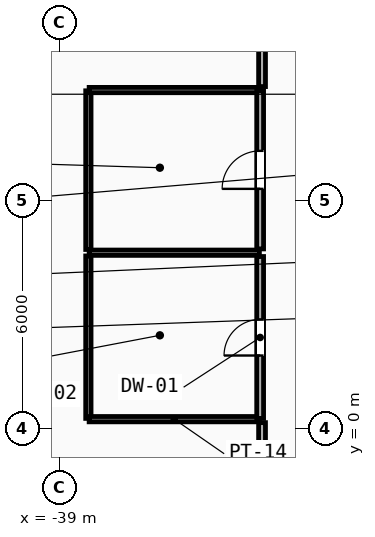
"""IFC4 building model, lengths in metres.
Left out: names, types, materials, properties, quantities, classifications, styles, units other than length and angle.
Written with IfcOpenShell. Run it as: python <this file> out.ifc"""

import sys

from ifc_helpers import new_model, si_unit, direction, frame, frame_2d, origin, place, context, subcontext, project, spatial, rectangle, extrude, element, fill, save


model = new_model("IFC4")
c1 = context("Model", 3, precision=1e-05, world=origin(), true_north=direction((0.0, 1.0)))
c2 = subcontext(c1, "Body", "Model", "MODEL_VIEW")
j1 = project(units=[si_unit("LENGTHUNIT", "METRE"), si_unit("PLANEANGLEUNIT", "RADIAN")], contexts=[c1])
p1 = place(None, origin())
s1 = spatial("IfcSite", under=j1, at=p1, CompositionType="ELEMENT")
p2 = place(p1, origin())
s2 = spatial("IfcBuilding", under=s1, at=p2, CompositionType="ELEMENT")
p3 = place(p2, frame((0.0, 0.0, 73.4)))
s3 = spatial("IfcBuildingStorey", under=s2, at=p3, CompositionType="ELEMENT", Elevation=73.4)
p4 = place(p3, frame((-38.24, 0.27, 0.0), z_axis=(0.0, 0.0, 1.0), x_axis=(0.0, 1.0, 0.0)))
e1 = element("IfcWall", 1, at=p4, inside=s3, PredefinedType="PARTITIONING", context=c2, shape_type="SweptSolid", body=[
    extrude(rectangle(XDim=4.275, YDim=0.14, at=frame_2d((2.137, 0.0))), origin(), (0.0, 0.0, 1.0), 3.52),
])
p5 = place(p3, frame((-38.24, 4.715, 0.0), z_axis=(0.0, 0.0, 1.0), x_axis=(0.0, 1.0, 0.0)))
e2 = element("IfcWall", 2, at=p5, inside=s3, PredefinedType="PARTITIONING", context=c2, shape_type="SweptSolid", body=[
    extrude(rectangle(XDim=4.175, YDim=0.14, at=frame_2d((2.087, 0.0))), origin(), (0.0, 0.0, 1.0), 3.52),
])
for number, where, z_axis, x_axis in (
    (3, (-38.22, 0.25, 0.0), (0.0, 0.0, 1.0), (1.0, 0.0, 0.0)),
    (4, (-38.22, 4.63, 0.0), (0.0, 0.0, 1.0), (1.0, 0.0, 0.0)),
    (5, (-38.22, 8.91, 0.0), (0.0, 0.0, 1.0), (1.0, 0.0, 0.0)),
):
    element("IfcWall", number, at=place(p3, frame(where, z_axis=z_axis, x_axis=x_axis)), inside=s3, PredefinedType="PARTITIONING", context=c2, shape_type="SweptSolid", body=[
        extrude(rectangle(XDim=4.48, YDim=0.14, at=frame_2d((2.24, 0.0))), origin(), (0.0, 0.0, 1.0), 3.52),
    ])
p6 = place(p3, frame((-33.72, 0.27, 0.0), z_axis=(0.0, 0.0, 1.0), x_axis=(0.0, 1.0, 0.0)))
e6 = element("IfcWall", 6, at=p6, inside=s3, PredefinedType="PARTITIONING", context=c2, shape_type="SweptSolid", body=[
    extrude(rectangle(XDim=4.26, YDim=0.18, at=frame_2d((2.13, 0.0))), origin(), (0.0, 0.0, 1.0), 3.52),
])
p7 = place(p6, frame((1.655, 0.0, 0.0)))
e7 = element("IfcOpeningElement", 7, at=p7, cuts=e6, PredefinedType="OPENING", context=c2, shape_type="SweptSolid", body=[
    extrude(rectangle(XDim=0.95, YDim=2.1, at=frame_2d((0.475, 1.05))), frame((0.0, 0.1, 0.0), z_axis=(0.0, -1.0, 0.0), x_axis=(1.0, 0.0, 0.0)), (0.0, 0.0, 1.0), 0.2),
])
p8 = place(p3, frame((-33.72, 4.73, 0.0), z_axis=(0.0, 0.0, 1.0), x_axis=(0.0, 1.0, 0.0)))
e8 = element("IfcWall", 8, at=p8, inside=s3, PredefinedType="PARTITIONING", context=c2, shape_type="SweptSolid", body=[
    extrude(rectangle(XDim=4.16, YDim=0.18, at=frame_2d((2.08, 0.0))), origin(), (0.0, 0.0, 1.0), 3.52),
])
p9 = place(p8, frame((1.58, 0.0, 0.0)))
e9 = element("IfcOpeningElement", 9, at=p9, cuts=e8, PredefinedType="OPENING", context=c2, shape_type="SweptSolid", body=[
    extrude(rectangle(XDim=1.0, YDim=2.15, at=frame_2d((0.5, 1.075))), frame((0.0, 0.1, 0.0), z_axis=(0.0, -1.0, 0.0), x_axis=(1.0, 0.0, 0.0)), (0.0, 0.0, 1.0), 0.2),
])
p10 = place(p3, frame((-33.67, 0.159, 0.0), z_axis=(0.0, 0.0, 1.0), x_axis=(0.0, -1.0, 0.0)))
e10 = element("IfcWall", 10, at=p10, inside=s3, PredefinedType="PARTITIONING", context=c2, shape_type="SweptSolid", body=[
    extrude(rectangle(XDim=11.559, YDim=0.18, at=frame_2d((5.779, 0.0))), origin(), (0.0, 0.0, 1.0), 3.52),
])
p11 = place(p3, frame((-33.67, 17.428, 0.0), z_axis=(0.0, 0.0, 1.0), x_axis=(0.0, -1.0, 0.0)))
e11 = element("IfcWall", 11, at=p11, inside=s3, PredefinedType="PARTITIONING", context=c2, shape_type="SweptSolid", body=[
    extrude(rectangle(XDim=8.427, YDim=0.18, at=frame_2d((4.213, 0.0))), origin(), (0.0, 0.0, 1.0), 3.52),
])
p12 = place(p7, origin())
e12 = element("IfcDoor", 12, at=p12, inside=s3, OperationType="SINGLE_SWING_LEFT", PredefinedType="DOOR", context=c2, shape_type="SweptSolid", body=[
    extrude(rectangle(XDim=0.95, YDim=2.1, at=frame_2d((0.475, 1.05))), frame((0.0, 0.025, 0.0), z_axis=(0.0, -1.0, 0.0), x_axis=(1.0, 0.0, 0.0)), (0.0, 0.0, 1.0), 0.05),
])
fill(e7, e12)
p13 = place(p9, origin())
e13 = element("IfcDoor", 13, at=p13, inside=s3, OperationType="SINGLE_SWING_LEFT", PredefinedType="DOOR", context=c2, shape_type="SweptSolid", body=[
    extrude(rectangle(XDim=1.0, YDim=2.15, at=frame_2d((0.5, 1.075))), frame((0.0, 0.025, 0.0), z_axis=(0.0, -1.0, 0.0), x_axis=(1.0, 0.0, 0.0)), (0.0, 0.0, 1.0), 0.05),
])
fill(e9, e13)
save(model, sys.argv[1])
